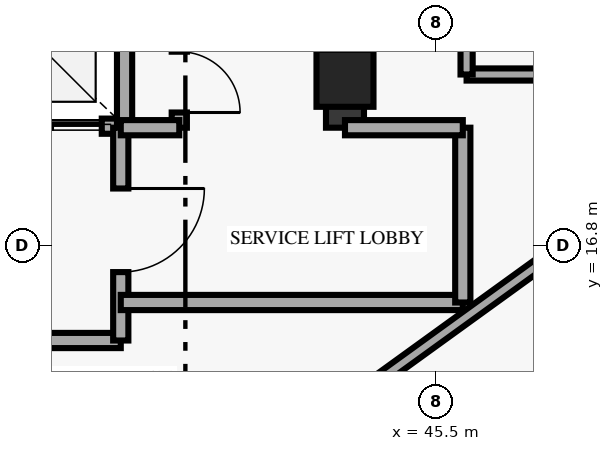
"""IFC4 building model, lengths in metres.
Left out: names, types, materials, properties, quantities, classifications, styles, units other than length and angle.
Written with IfcOpenShell. Run it as: python <this file> out.ifc"""

import sys

from ifc_helpers import new_model, si_unit, direction, frame, frame_2d, origin, origin_2d, place, context, subcontext, project, spatial, rectangle, extrude, element, fill, save


model = new_model("IFC4")
c1 = context("Model", 3, precision=1e-05, world=origin(), true_north=direction((0.0, 1.0)))
c2 = subcontext(c1, "Body", "Model", "MODEL_VIEW")
j1 = project(units=[si_unit("LENGTHUNIT", "METRE"), si_unit("PLANEANGLEUNIT", "RADIAN")], contexts=[c1])
p1 = place(None, origin())
s1 = spatial("IfcSite", under=j1, at=p1, CompositionType="ELEMENT")
p2 = place(p1, origin())
s2 = spatial("IfcBuilding", under=s1, at=p2, CompositionType="ELEMENT")
p3 = place(p2, frame((0.0, 0.0, 255.6)))
s3 = spatial("IfcBuildingStorey", under=s2, at=p3, CompositionType="ELEMENT", Elevation=255.6)
p4 = place(p3, frame((44.3, 19.0, 0.0), z_axis=(0.0, 0.0, 1.0), x_axis=(1.0, 0.0, 0.0)))
e1 = element("IfcColumn", 1, at=p4, inside=s3, PredefinedType="PILASTER", context=c2, shape_type="SweptSolid", body=[
    extrude(rectangle(XDim=0.75, YDim=0.75, at=origin_2d()), origin(), (0.0, 0.0, 1.0), 3.54),
])
p5 = place(p3, frame((44.3, 18.35, 0.0), z_axis=(0.0, 0.0, 1.0), x_axis=(0.0, 1.0, 0.0)))
e2 = element("IfcWall", 2, at=p5, inside=s3, PredefinedType="SHEAR", context=c2, shape_type="SweptSolid", body=[
    extrude(rectangle(XDim=2.95, YDim=0.5, at=frame_2d((1.475, 0.0))), origin(), (0.0, 0.0, 1.0), 3.54),
])
p6 = place(p3, frame((38.57, 18.37, 0.0), z_axis=(0.0, 0.0, 1.0), x_axis=(1.0, 0.0, 0.0)))
e3 = element("IfcWall", 3, at=p6, inside=s3, PredefinedType="SOLIDWALL", context=c2, shape_type="SweptSolid", body=[
    extrude(rectangle(XDim=2.83, YDim=0.2, at=frame_2d((1.415, 0.0))), origin(), (0.0, 0.0, 1.0), 3.54),
])
p7 = place(p6, frame((1.18, 0.0, 0.0)))
e4 = element("IfcOpeningElement", 4, at=p7, cuts=e3, PredefinedType="OPENING", context=c2, shape_type="SweptSolid", body=[
    extrude(rectangle(XDim=1.35, YDim=2.18, at=frame_2d((0.675, 1.09))), frame((0.0, 0.11, 0.0), z_axis=(0.0, -1.0, 0.0), x_axis=(1.0, 0.0, 0.0)), (0.0, 0.0, 1.0), 0.22),
])
p8 = place(p3, frame((41.4, 18.37, 0.0), z_axis=(0.0, 0.0, 1.0), x_axis=(0.0, 1.0, 0.0)))
e5 = element("IfcWall", 5, at=p8, inside=s3, PredefinedType="SOLIDWALL", context=c2, shape_type="SweptSolid", body=[
    extrude(rectangle(XDim=2.71, YDim=0.2, at=frame_2d((1.355, 0.0))), origin(), (0.0, 0.0, 1.0), 3.54),
])
p9 = place(p3, frame((45.9, 19.05, 0.0), z_axis=(0.0, 0.0, 1.0), x_axis=(1.0, 0.0, 0.0)))
e6 = element("IfcWall", 6, at=p9, inside=s3, PredefinedType="PARTITIONING", context=c2, shape_type="SweptSolid", body=[
    extrude(rectangle(XDim=3.05, YDim=0.16, at=frame_2d((1.525, 0.0))), origin(), (0.0, 0.0, 1.0), 3.54),
])
p10 = place(p3, frame((45.9, 19.05, 0.0), z_axis=(0.0, 0.0, 1.0), x_axis=(0.0, 1.0, 0.0)))
e7 = element("IfcWall", 7, at=p10, inside=s3, PredefinedType="PARTITIONING", context=c2, shape_type="SweptSolid", body=[
    extrude(rectangle(XDim=7.07, YDim=0.16, at=frame_2d((3.535, 0.0))), origin(), (0.0, 0.0, 1.0), 3.54),
])
p11 = place(p3, frame((33.8, 15.55, 0.0), z_axis=(0.0, 0.0, 1.0), x_axis=(1.0, 0.0, 0.0)))
e8 = element("IfcWall", 8, at=p11, inside=s3, PredefinedType="SOLIDWALL", context=c2, shape_type="SweptSolid", body=[
    extrude(rectangle(XDim=7.55, YDim=0.2, at=frame_2d((3.775, 0.0))), origin(), (0.0, 0.0, 1.0), 3.54),
])
p12 = place(p3, frame((41.35, 15.55, 0.0), z_axis=(0.0, 0.0, 1.0), x_axis=(0.0, 1.0, 0.0)))
e9 = element("IfcWall", 9, at=p12, inside=s3, PredefinedType="SOLIDWALL", context=c2, shape_type="SweptSolid", body=[
    extrude(rectangle(XDim=2.8, YDim=0.2, at=frame_2d((1.4, 0.0))), origin(), (0.0, 0.0, 1.0), 3.54),
])
p13 = place(p12, frame((0.9, 0.0, 0.0)))
e10 = element("IfcOpeningElement", 10, at=p13, cuts=e9, PredefinedType="OPENING", context=c2, shape_type="SweptSolid", body=[
    extrude(rectangle(XDim=1.1, YDim=2.15, at=frame_2d((0.55, 1.075))), frame((0.0, 0.11, 0.0), z_axis=(0.0, -1.0, 0.0), x_axis=(1.0, 0.0, 0.0)), (0.0, 0.0, 1.0), 0.22),
])
p14 = place(p3, frame((41.35, 16.05, 0.0), z_axis=(0.0, 0.0, 1.0), x_axis=(1.0, 0.0, 0.0)))
e11 = element("IfcWall", 11, at=p14, inside=s3, PredefinedType="SOLIDWALL", context=c2, shape_type="SweptSolid", body=[
    extrude(rectangle(XDim=4.5, YDim=0.2, at=frame_2d((2.25, 0.0))), origin(), (0.0, 0.0, 1.0), 3.54),
])
p15 = place(p3, frame((45.85, 16.05, 0.0), z_axis=(0.0, 0.0, 1.0), x_axis=(0.0, 1.0, 0.0)))
e12 = element("IfcWall", 12, at=p15, inside=s3, PredefinedType="SOLIDWALL", context=c2, shape_type="SweptSolid", body=[
    extrude(rectangle(XDim=2.3, YDim=0.2, at=frame_2d((1.15, 0.0))), origin(), (0.0, 0.0, 1.0), 3.54),
])
p16 = place(p3, frame((44.3, 18.35, 0.0), z_axis=(0.0, 0.0, 1.0), x_axis=(1.0, 0.0, 0.0)))
e13 = element("IfcWall", 13, at=p16, inside=s3, PredefinedType="SOLIDWALL", context=c2, shape_type="SweptSolid", body=[
    extrude(rectangle(XDim=1.55, YDim=0.2, at=frame_2d((0.775, 0.0))), origin(), (0.0, 0.0, 1.0), 3.54),
])
p17 = place(p3, frame((42.12, 18.35, 0.0), z_axis=(0.0, 0.0, 1.0), x_axis=(0.0, 1.0, 0.0)))
e14 = element("IfcWall", 14, at=p17, inside=s3, PredefinedType="SOLIDWALL", context=c2, shape_type="SweptSolid", body=[
    extrude(rectangle(XDim=2.95, YDim=0.2, at=frame_2d((1.475, 0.0))), origin(), (0.0, 0.0, 1.0), 3.54),
])
p18 = place(p17, frame((0.2, 0.0, 0.0)))
e15 = element("IfcOpeningElement", 15, at=p18, cuts=e14, PredefinedType="OPENING", context=c2, shape_type="SweptSolid", body=[
    extrude(rectangle(XDim=0.8, YDim=2.05, at=frame_2d((0.4, 1.025))), frame((0.0, 0.11, 0.0), z_axis=(0.0, -1.0, 0.0), x_axis=(1.0, 0.0, 0.0)), (0.0, 0.0, 1.0), 0.22),
])
p19 = place(p3, frame((41.35, 18.35, 0.0), z_axis=(0.0, 0.0, 1.0), x_axis=(1.0, 0.0, 0.0)))
e16 = element("IfcWall", 16, at=p19, inside=s3, PredefinedType="SOLIDWALL", context=c2, shape_type="SweptSolid", body=[
    extrude(rectangle(XDim=0.77, YDim=0.2, at=frame_2d((0.385, 0.0))), origin(), (0.0, 0.0, 1.0), 3.54),
])
p20 = place(p3, frame((41.951, 13.007, 0.0), z_axis=(0.0, 0.0, 1.0), x_axis=(0.810290119061, 0.586028943784, 0.0)))
e17 = element("IfcWall", 17, at=p20, inside=s3, PredefinedType="PARTITIONING", context=c2, shape_type="SweptSolid", body=[
    extrude(rectangle(XDim=6.306, YDim=0.16, at=frame_2d((3.153, 0.0))), origin(), (0.0, 0.0, 1.0), 3.54),
])
p21 = place(p3, frame((48.991, 15.599, 0.0), z_axis=(0.0, 0.0, 1.0), x_axis=(-0.758094504626, -0.652144709444, 0.0)))
e18 = element("IfcWall", 18, at=p21, inside=s3, PredefinedType="PARTITIONING", context=c2, shape_type="SweptSolid", body=[
    extrude(rectangle(XDim=3.86, YDim=0.125, at=frame_2d((1.93, 0.0))), origin(), (0.0, 0.0, 1.0), 3.54),
])
p22 = place(p21, frame((0.702, 0.0, 0.0)))
e19 = element("IfcOpeningElement", 19, at=p22, cuts=e18, PredefinedType="OPENING", context=c2, shape_type="SweptSolid", body=[
    extrude(rectangle(XDim=0.9, YDim=2.1, at=frame_2d((0.45, 1.05))), frame((0.0, 0.073, 0.0), z_axis=(0.0, -1.0, 0.0), x_axis=(1.0, 0.0, 0.0)), (0.0, 0.0, 1.0), 0.145),
])
p23 = place(p7, origin())
e20 = element("IfcDoor", 20, at=p23, inside=s3, OperationType="DOUBLE_DOOR_SLIDING", PredefinedType="DOOR", context=c2, shape_type="SweptSolid", body=[
    extrude(rectangle(XDim=1.35, YDim=2.18, at=frame_2d((0.675, 1.09))), frame((0.0, 0.025, 0.0), z_axis=(0.0, -1.0, 0.0), x_axis=(1.0, 0.0, 0.0)), (0.0, 0.0, 1.0), 0.05),
])
fill(e4, e20)
p24 = place(p13, origin())
e21 = element("IfcDoor", 21, at=p24, inside=s3, OperationType="SINGLE_SWING_RIGHT", PredefinedType="DOOR", context=c2, shape_type="SweptSolid", body=[
    extrude(rectangle(XDim=1.1, YDim=2.15, at=frame_2d((0.55, 1.075))), frame((0.0, 0.025, 0.0), z_axis=(0.0, -1.0, 0.0), x_axis=(1.0, 0.0, 0.0)), (0.0, 0.0, 1.0), 0.05),
])
fill(e10, e21)
p25 = place(p18, origin())
e22 = element("IfcDoor", 22, at=p25, inside=s3, OperationType="SINGLE_SWING_LEFT", PredefinedType="DOOR", context=c2, shape_type="SweptSolid", body=[
    extrude(rectangle(XDim=0.8, YDim=2.05, at=frame_2d((0.4, 1.025))), frame((0.0, 0.025, 0.0), z_axis=(0.0, -1.0, 0.0), x_axis=(1.0, 0.0, 0.0)), (0.0, 0.0, 1.0), 0.05),
])
fill(e15, e22)
save(model, sys.argv[1])
